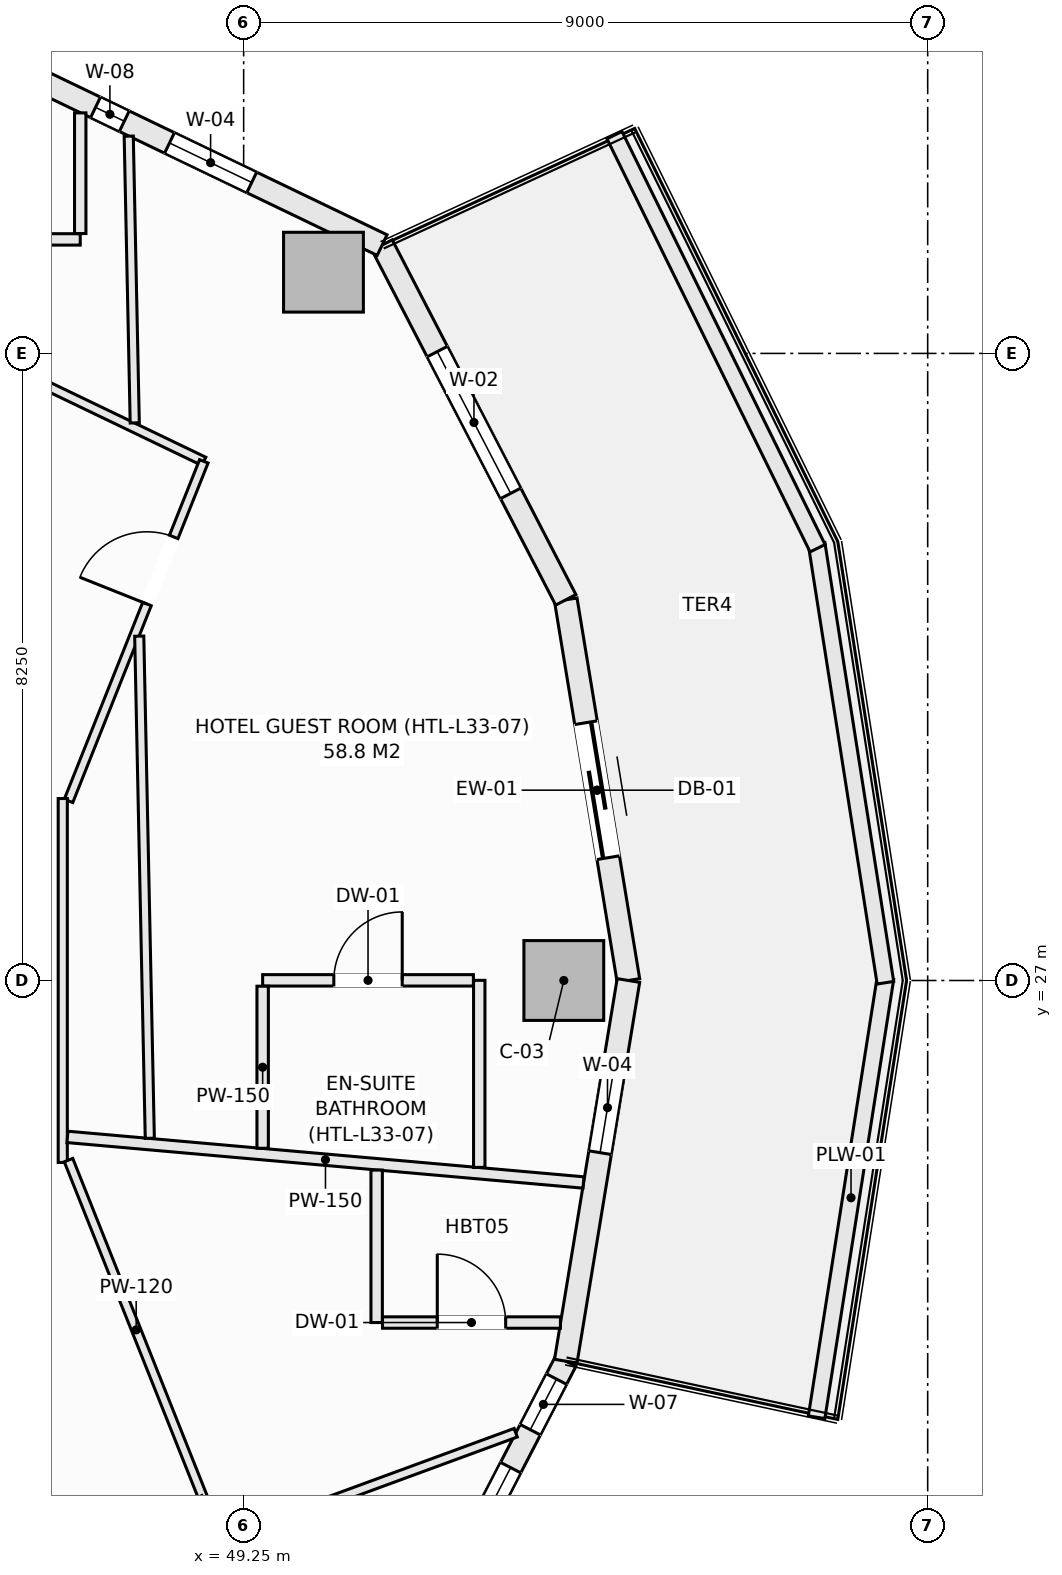
"""IFC4 building model, lengths in metres.
Left out: names, types, materials, properties, quantities, classifications, styles, units other than length and angle.
Written with IfcOpenShell. Run it as: python <this file> out.ifc"""

import sys

from ifc_helpers import new_model, si_unit, direction, frame, frame_2d, origin, origin_2d, place, context, subcontext, project, spatial, rectangle, extrude, element, fill, save


model = new_model("IFC4")
c1 = context("Model", 3, precision=1e-05, world=origin(), true_north=direction((0.0, 1.0)))
c2 = subcontext(c1, "Body", "Model", "MODEL_VIEW")
j1 = project(units=[si_unit("LENGTHUNIT", "METRE"), si_unit("PLANEANGLEUNIT", "RADIAN")], contexts=[c1])
p1 = place(None, origin())
s1 = spatial("IfcSite", under=j1, at=p1, CompositionType="ELEMENT")
p2 = place(p1, origin())
s2 = spatial("IfcBuilding", under=s1, at=p2, CompositionType="ELEMENT")
p3 = place(p2, frame((0.0, 0.0, 132.5)))
s3 = spatial("IfcBuildingStorey", under=s2, at=p3, CompositionType="ELEMENT", Elevation=132.5)
for number, where, z_axis, x_axis in (
    (1, (53.462, 27.0, -0.27), (0.0, 0.0, 1.0), (1.0, 0.0, 0.0)),
    (2, (50.3, 36.319, -0.27), (0.0, 0.0, 1.0), (1.0, 0.0, 0.0)),
):
    element("IfcColumn", number, at=place(p3, frame(where, z_axis=z_axis, x_axis=x_axis)), inside=s3, PredefinedType="COLUMN", context=c2, shape_type="SweptSolid", body=[
        extrude(rectangle(XDim=1.05, YDim=1.05, at=origin_2d()), origin(), (0.0, 0.0, 1.0), 3.4),
    ])
p4 = place(p3, frame((53.488, 32.008, 0.0), z_axis=(0.0, 0.0, 1.0), x_axis=(0.162393944769, -0.986726003864, 0.0)))
e3 = element("IfcWall", 3, at=p4, inside=s3, PredefinedType="SOLIDWALL", context=c2, shape_type="SweptSolid", body=[
    extrude(rectangle(XDim=5.075, YDim=0.3, at=frame_2d((2.538, 0.0))), origin(), (0.0, 0.0, 1.0), 2.653),
])
p5 = place(p4, frame((1.638, 0.0, 0.0)))
e4 = element("IfcOpeningElement", 4, at=p5, cuts=e3, PredefinedType="OPENING", context=c2, shape_type="SweptSolid", body=[
    extrude(rectangle(XDim=1.8, YDim=2.25, at=frame_2d((0.9, 1.125))), frame((0.0, 0.16, 0.0), z_axis=(0.0, -1.0, 0.0), x_axis=(1.0, 0.0, 0.0)), (0.0, 0.0, 1.0), 0.32),
])
p6 = place(p3, frame((51.072, 36.675, 0.0), z_axis=(0.0, 0.0, 1.0), x_axis=(0.459767899643, -0.888039119892, 0.0)))
e5 = element("IfcWall", 5, at=p6, inside=s3, PredefinedType="SOLIDWALL", context=c2, shape_type="SweptSolid", body=[
    extrude(rectangle(XDim=5.255, YDim=0.3, at=frame_2d((2.628, 0.0))), origin(), (0.0, 0.0, 1.0), 2.653),
])
p7 = place(p6, frame((1.578, 0.0, 0.74)))
e6 = element("IfcOpeningElement", 6, at=p7, cuts=e5, PredefinedType="OPENING", context=c2, shape_type="SweptSolid", body=[
    extrude(rectangle(XDim=2.1, YDim=1.7, at=frame_2d((1.05, 0.85))), frame((0.0, 0.16, 0.0), z_axis=(0.0, -1.0, 0.0), x_axis=(1.0, 0.0, 0.0)), (0.0, 0.0, 1.0), 0.32),
])
p8 = place(p3, frame((45.769, 39.223, 0.0), z_axis=(0.0, 0.0, 1.0), x_axis=(0.901370184739, -0.433049408339, 0.0)))
e7 = element("IfcWall", 7, at=p8, inside=s3, PredefinedType="SOLIDWALL", context=c2, shape_type="SweptSolid", body=[
    extrude(rectangle(XDim=5.884, YDim=0.3, at=frame_2d((2.942, 0.0))), origin(), (0.0, 0.0, 1.0), 2.653),
])
p9 = place(p8, frame((2.78, 0.0, 0.72)))
e8 = element("IfcOpeningElement", 8, at=p9, cuts=e7, PredefinedType="OPENING", context=c2, shape_type="SweptSolid", body=[
    extrude(rectangle(XDim=1.2, YDim=1.65, at=frame_2d((0.6, 0.825))), frame((0.0, 0.16, 0.0), z_axis=(0.0, -1.0, 0.0), x_axis=(1.0, 0.0, 0.0)), (0.0, 0.0, 1.0), 0.32),
])
p10 = place(p8, frame((1.7, 0.0, 0.72)))
e9 = element("IfcOpeningElement", 9, at=p10, cuts=e7, PredefinedType="OPENING", context=c2, shape_type="SweptSolid", body=[
    extrude(rectangle(XDim=0.42, YDim=1.65, at=frame_2d((0.21, 0.825))), frame((0.0, 0.16, 0.0), z_axis=(0.0, -1.0, 0.0), x_axis=(1.0, 0.0, 0.0)), (0.0, 0.0, 1.0), 0.32),
])
p11 = place(p3, frame((51.072, 17.325, 0.0), z_axis=(0.0, 0.0, 1.0), x_axis=(0.459767899643, 0.888039119892, 0.0)))
e10 = element("IfcWall", 10, at=p11, inside=s3, PredefinedType="SOLIDWALL", context=c2, shape_type="SweptSolid", body=[
    extrude(rectangle(XDim=5.255, YDim=0.3, at=frame_2d((2.628, 0.0))), origin(), (0.0, 0.0, 1.0), 2.653),
])
p12 = place(p11, frame((1.578, 0.0, 0.74)))
e11 = element("IfcOpeningElement", 11, at=p12, cuts=e10, PredefinedType="OPENING", context=c2, shape_type="SweptSolid", body=[
    extrude(rectangle(XDim=2.1, YDim=1.7, at=frame_2d((1.05, 0.85))), frame((0.0, 0.16, 0.0), z_axis=(0.0, -1.0, 0.0), x_axis=(1.0, 0.0, 0.0)), (0.0, 0.0, 1.0), 0.32),
])
p13 = place(p11, frame((4.24, 0.0, 0.72)))
e12 = element("IfcOpeningElement", 12, at=p13, cuts=e10, PredefinedType="OPENING", context=c2, shape_type="SweptSolid", body=[
    extrude(rectangle(XDim=0.75, YDim=1.65, at=frame_2d((0.375, 0.825))), frame((0.0, 0.16, 0.0), z_axis=(0.0, -1.0, 0.0), x_axis=(1.0, 0.0, 0.0)), (0.0, 0.0, 1.0), 0.32),
])
p14 = place(p3, frame((53.488, 21.992, 0.0), z_axis=(0.0, 0.0, 1.0), x_axis=(0.162393944769, 0.986726003864, 0.0)))
e13 = element("IfcWall", 13, at=p14, inside=s3, PredefinedType="SOLIDWALL", context=c2, shape_type="SweptSolid", body=[
    extrude(rectangle(XDim=5.075, YDim=0.3, at=frame_2d((2.538, 0.0))), origin(), (0.0, 0.0, 1.0), 2.653),
])
p15 = place(p14, frame((2.78, 0.0, 0.72)))
e14 = element("IfcOpeningElement", 14, at=p15, cuts=e13, PredefinedType="OPENING", context=c2, shape_type="SweptSolid", body=[
    extrude(rectangle(XDim=1.2, YDim=1.65, at=frame_2d((0.6, 0.825))), frame((0.0, 0.16, 0.0), z_axis=(0.0, -1.0, 0.0), x_axis=(1.0, 0.0, 0.0)), (0.0, 0.0, 1.0), 0.32),
])
for number, where, z_axis, x_axis in (
    (15, (56.789, 21.254, 0.0), (0.0, 0.0, 1.0), (0.155, 0.988, 0.0)),
    (16, (56.789, 32.746, 0.0), (0.0, 0.0, 1.0), (0.155, -0.988, 0.0)),
):
    element("IfcWall", number, at=place(p3, frame(where, z_axis=z_axis, x_axis=x_axis)), inside=s3, PredefinedType="PARAPET", context=c2, shape_type="SweptSolid", body=[
        extrude(rectangle(XDim=5.846, YDim=0.22, at=frame_2d((2.923, 0.0))), origin(), (0.0, 0.0, 1.0), 0.52),
    ])
p16 = place(p3, frame((54.129, 38.122, 0.0), z_axis=(0.0, 0.0, 1.0), x_axis=(0.441269631716, -0.897374566235, 0.0)))
e17 = element("IfcWall", 17, at=p16, inside=s3, PredefinedType="PARAPET", context=c2, shape_type="SweptSolid", body=[
    extrude(rectangle(XDim=6.056, YDim=0.22, at=frame_2d((3.028, 0.0))), origin(), (0.0, 0.0, 1.0), 0.52),
])
p17 = place(p3, frame((46.65, 34.828, 0.0), z_axis=(0.0, 0.0, 1.0), x_axis=(0.901271525254, -0.433254703109, 0.0)))
e18 = element("IfcWall", 18, at=p17, inside=s3, PredefinedType="PARTITIONING", context=c2, shape_type="SweptSolid", body=[
    extrude(rectangle(XDim=2.304, YDim=0.12, at=frame_2d((1.152, 0.0))), origin(), (0.0, 0.0, 1.0), 3.13),
])
p18 = place(p3, frame((46.946, 29.363, 0.0), z_axis=(0.0, 0.0, 1.0), x_axis=(0.370173596818, 0.928962597858, 0.0)))
e19 = element("IfcWall", 19, at=p18, inside=s3, PredefinedType="PARTITIONING", context=c2, shape_type="SweptSolid", body=[
    extrude(rectangle(XDim=4.809, YDim=0.12, at=frame_2d((2.404, 0.0))), origin(), (0.0, 0.0, 1.0), 3.13),
])
p19 = place(p18, frame((2.788, 0.0, 0.0)))
e20 = element("IfcOpeningElement", 20, at=p19, cuts=e19, PredefinedType="OPENING", context=c2, shape_type="SweptSolid", body=[
    extrude(rectangle(XDim=0.95, YDim=2.1, at=frame_2d((0.475, 1.05))), frame((0.0, 0.07, 0.0), z_axis=(0.0, -1.0, 0.0), x_axis=(1.0, 0.0, 0.0)), (0.0, 0.0, 1.0), 0.14),
])
p20 = place(p3, frame((46.87, 24.606, 0.0), z_axis=(0.0, 0.0, 1.0), x_axis=(0.0, 1.0, 0.0)))
e21 = element("IfcWall", 21, at=p20, inside=s3, PredefinedType="PARTITIONING", context=c2, shape_type="SweptSolid", body=[
    extrude(rectangle(XDim=4.788, YDim=0.12, at=frame_2d((2.394, 0.0))), origin(), (0.0, 0.0, 1.0), 3.13),
])
p21 = place(p3, frame((46.946, 24.637, 0.0), z_axis=(0.0, 0.0, 1.0), x_axis=(0.370173596818, -0.928962597858, 0.0)))
e22 = element("IfcWall", 22, at=p21, inside=s3, PredefinedType="PARTITIONING", context=c2, shape_type="SweptSolid", body=[
    extrude(rectangle(XDim=4.809, YDim=0.12, at=frame_2d((2.404, 0.0))), origin(), (0.0, 0.0, 1.0), 3.13),
])
p22 = place(p3, frame((46.932, 24.942, 0.0), z_axis=(0.0, 0.0, 1.0), x_axis=(0.996119604576, -0.088009848195, 0.0)))
e23 = element("IfcWall", 23, at=p22, inside=s3, PredefinedType="PARTITIONING", context=c2, shape_type="SweptSolid", body=[
    extrude(rectangle(XDim=6.816, YDim=0.15, at=frame_2d((3.408, 0.0))), origin(), (0.0, 0.0, 1.0), 3.13),
])
p23 = place(p3, frame((39.082, 16.003, 0.0), z_axis=(0.0, 0.0, 1.0), x_axis=(0.93872535699, 0.344666076288, 0.0)))
e24 = element("IfcWall", 24, at=p23, inside=s3, PredefinedType="PARTITIONING", context=c2, shape_type="SweptSolid", body=[
    extrude(rectangle(XDim=14.645, YDim=0.12, at=frame_2d((7.323, 0.0))), origin(), (0.0, 0.0, 1.0), 3.13),
])
p24 = place(p3, frame((51.0, 22.5, 0.0), z_axis=(0.0, 0.0, 1.0), x_axis=(0.0, 1.0, 0.0)))
e25 = element("IfcWall", 25, at=p24, inside=s3, PredefinedType="PARTITIONING", context=c2, shape_type="SweptSolid", body=[
    extrude(rectangle(XDim=2.006, YDim=0.15, at=frame_2d((1.003, 0.0))), origin(), (0.0, 0.0, 1.0), 3.13),
])
p25 = place(p3, frame((51.077, 22.5, 0.0), z_axis=(0.0, 0.0, 1.0), x_axis=(1.0, 0.0, 0.0)))
e26 = element("IfcWall", 26, at=p25, inside=s3, PredefinedType="PARTITIONING", context=c2, shape_type="SweptSolid", body=[
    extrude(rectangle(XDim=2.341, YDim=0.15, at=frame_2d((1.17, 0.0))), origin(), (0.0, 0.0, 1.0), 2.812),
])
p26 = place(p25, frame((0.72, 0.0, 0.0)))
e27 = element("IfcOpeningElement", 27, at=p26, cuts=e26, PredefinedType="OPENING", context=c2, shape_type="SweptSolid", body=[
    extrude(rectangle(XDim=0.9, YDim=2.1, at=frame_2d((0.45, 1.05))), frame((0.0, 0.085, 0.0), z_axis=(0.0, -1.0, 0.0), x_axis=(1.0, 0.0, 0.0)), (0.0, 0.0, 1.0), 0.17),
])
p27 = place(p3, frame((52.35, 24.541, 0.0), z_axis=(0.0, 0.0, 1.0), x_axis=(0.0, 1.0, 0.0)))
e28 = element("IfcWall", 28, at=p27, inside=s3, PredefinedType="PARTITIONING", context=c2, shape_type="SweptSolid", body=[
    extrude(rectangle(XDim=2.461, YDim=0.15, at=frame_2d((1.23, 0.0))), origin(), (0.0, 0.0, 1.0), 3.13),
])
p28 = place(p3, frame((49.5, 27.002, 0.0), z_axis=(0.0, 0.0, 1.0), x_axis=(1.0, 0.0, 0.0)))
e29 = element("IfcWall", 29, at=p28, inside=s3, PredefinedType="PARTITIONING", context=c2, shape_type="SweptSolid", body=[
    extrude(rectangle(XDim=2.773, YDim=0.15, at=frame_2d((1.386, 0.0))), origin(), (0.0, 0.0, 1.0), 2.505),
])
p29 = place(p28, frame((0.937, 0.0, 0.0)))
e30 = element("IfcOpeningElement", 30, at=p29, cuts=e29, PredefinedType="OPENING", context=c2, shape_type="SweptSolid", body=[
    extrude(rectangle(XDim=0.9, YDim=2.1, at=frame_2d((0.45, 1.05))), frame((0.0, 0.085, 0.0), z_axis=(0.0, -1.0, 0.0), x_axis=(1.0, 0.0, 0.0)), (0.0, 0.0, 1.0), 0.17),
])
p30 = place(p3, frame((49.5, 24.793, 0.0), z_axis=(0.0, 0.0, 1.0), x_axis=(0.0, 1.0, 0.0)))
e31 = element("IfcWall", 31, at=p30, inside=s3, PredefinedType="PARTITIONING", context=c2, shape_type="SweptSolid", body=[
    extrude(rectangle(XDim=2.132, YDim=0.15, at=frame_2d((1.066, 0.0))), origin(), (0.0, 0.0, 1.0), 3.13),
])
p31 = place(p3, frame((47.738, 38.108, 0.0), z_axis=(0.0, 0.0, 1.0), x_axis=(0.021028225265, -0.999778882425, 0.0)))
e32 = element("IfcWall", 32, at=p31, inside=s3, PredefinedType="PARTITIONING", context=c2, shape_type="SweptSolid", body=[
    extrude(rectangle(XDim=3.773, YDim=0.12, at=frame_2d((1.887, 0.0))), origin(), (0.0, 0.0, 1.0), 3.13),
])
p32 = place(p3, frame((47.876, 31.53, 0.0), z_axis=(0.0, 0.0, 1.0), x_axis=(0.021060407881, -0.999778205013, 0.0)))
e33 = element("IfcWall", 33, at=p32, inside=s3, PredefinedType="PARTITIONING", context=c2, shape_type="SweptSolid", body=[
    extrude(rectangle(XDim=6.608, YDim=0.12, at=frame_2d((3.304, 0.0))), origin(), (0.0, 0.0, 1.0), 3.13),
])
p33 = place(p3, frame((44.225, 36.75, 0.0), z_axis=(0.0, 0.0, 1.0), x_axis=(1.0, 0.0, 0.0)))
e34 = element("IfcWall", 34, at=p33, inside=s3, PredefinedType="PARTITIONING", context=c2, shape_type="SweptSolid", body=[
    extrude(rectangle(XDim=2.875, YDim=0.15, at=frame_2d((1.438, 0.0))), origin(), (0.0, 0.0, 1.0), 3.13),
])
p34 = place(p33, frame((0.988, 0.0, 0.0)))
e35 = element("IfcOpeningElement", 35, at=p34, cuts=e34, PredefinedType="OPENING", context=c2, shape_type="SweptSolid", body=[
    extrude(rectangle(XDim=0.9, YDim=2.1, at=frame_2d((0.45, 1.05))), frame((0.0, 0.085, 0.0), z_axis=(0.0, -1.0, 0.0), x_axis=(1.0, 0.0, 0.0)), (0.0, 0.0, 1.0), 0.17),
])
p35 = place(p3, frame((47.1, 36.827, 0.0), z_axis=(0.0, 0.0, 1.0), x_axis=(0.0, 1.0, 0.0)))
e36 = element("IfcWall", 36, at=p35, inside=s3, PredefinedType="PARTITIONING", context=c2, shape_type="SweptSolid", body=[
    extrude(rectangle(XDim=1.588, YDim=0.15, at=frame_2d((0.794, 0.0))), origin(), (0.0, 0.0, 1.0), 3.13),
])
p36 = place(p5, origin())
e37 = element("IfcDoor", 37, at=p36, inside=s3, OperationType="SLIDING_TO_LEFT", PredefinedType="DOOR", context=c2, shape_type="SweptSolid", body=[
    extrude(rectangle(XDim=1.8, YDim=2.25, at=frame_2d((0.9, 1.125))), frame((0.0, 0.025, 0.0), z_axis=(0.0, -1.0, 0.0), x_axis=(1.0, 0.0, 0.0)), (0.0, 0.0, 1.0), 0.05),
])
fill(e4, e37)
p37 = place(p7, origin())
e38 = element("IfcWindow", 38, at=p37, inside=s3, PartitioningType="SINGLE_PANEL", PredefinedType="WINDOW", context=c2, shape_type="SweptSolid", body=[
    extrude(rectangle(XDim=2.1, YDim=1.7, at=frame_2d((1.05, 0.85))), frame((0.0, 0.03, 0.0), z_axis=(0.0, -1.0, 0.0), x_axis=(1.0, 0.0, 0.0)), (0.0, 0.0, 1.0), 0.06),
])
fill(e6, e38)
p38 = place(p9, origin())
e39 = element("IfcWindow", 39, at=p38, inside=s3, PartitioningType="SINGLE_PANEL", PredefinedType="WINDOW", context=c2, shape_type="SweptSolid", body=[
    extrude(rectangle(XDim=1.2, YDim=1.65, at=frame_2d((0.6, 0.825))), frame((0.0, 0.03, 0.0), z_axis=(0.0, -1.0, 0.0), x_axis=(1.0, 0.0, 0.0)), (0.0, 0.0, 1.0), 0.06),
])
fill(e8, e39)
p39 = place(p12, origin())
e40 = element("IfcWindow", 40, at=p39, inside=s3, PartitioningType="SINGLE_PANEL", PredefinedType="WINDOW", context=c2, shape_type="SweptSolid", body=[
    extrude(rectangle(XDim=2.1, YDim=1.7, at=frame_2d((1.05, 0.85))), frame((0.0, 0.03, 0.0), z_axis=(0.0, -1.0, 0.0), x_axis=(1.0, 0.0, 0.0)), (0.0, 0.0, 1.0), 0.06),
])
fill(e11, e40)
p40 = place(p15, origin())
e41 = element("IfcWindow", 41, at=p40, inside=s3, PartitioningType="SINGLE_PANEL", PredefinedType="WINDOW", context=c2, shape_type="SweptSolid", body=[
    extrude(rectangle(XDim=1.2, YDim=1.65, at=frame_2d((0.6, 0.825))), frame((0.0, 0.03, 0.0), z_axis=(0.0, -1.0, 0.0), x_axis=(1.0, 0.0, 0.0)), (0.0, 0.0, 1.0), 0.06),
])
fill(e14, e41)
p41 = place(p19, origin())
e42 = element("IfcDoor", 42, at=p41, inside=s3, OperationType="SINGLE_SWING_LEFT", PredefinedType="DOOR", context=c2, shape_type="SweptSolid", body=[
    extrude(rectangle(XDim=0.95, YDim=2.1, at=frame_2d((0.475, 1.05))), frame((0.0, 0.025, 0.0), z_axis=(0.0, -1.0, 0.0), x_axis=(1.0, 0.0, 0.0)), (0.0, 0.0, 1.0), 0.05),
])
fill(e20, e42)
p42 = place(p26, origin())
e43 = element("IfcDoor", 43, at=p42, inside=s3, OperationType="SINGLE_SWING_LEFT", PredefinedType="DOOR", context=c2, shape_type="SweptSolid", body=[
    extrude(rectangle(XDim=0.9, YDim=2.1, at=frame_2d((0.45, 1.05))), frame((0.0, 0.025, 0.0), z_axis=(0.0, -1.0, 0.0), x_axis=(1.0, 0.0, 0.0)), (0.0, 0.0, 1.0), 0.05),
])
fill(e27, e43)
p43 = place(p29, origin())
e44 = element("IfcDoor", 44, at=p43, inside=s3, OperationType="SINGLE_SWING_RIGHT", PredefinedType="DOOR", context=c2, shape_type="SweptSolid", body=[
    extrude(rectangle(XDim=0.9, YDim=2.1, at=frame_2d((0.45, 1.05))), frame((0.0, 0.025, 0.0), z_axis=(0.0, -1.0, 0.0), x_axis=(1.0, 0.0, 0.0)), (0.0, 0.0, 1.0), 0.05),
])
fill(e30, e44)
p44 = place(p13, origin())
e45 = element("IfcWindow", 45, at=p44, inside=s3, PartitioningType="SINGLE_PANEL", PredefinedType="WINDOW", context=c2, shape_type="SweptSolid", body=[
    extrude(rectangle(XDim=0.75, YDim=1.65, at=frame_2d((0.375, 0.825))), frame((0.0, 0.03, 0.0), z_axis=(0.0, -1.0, 0.0), x_axis=(1.0, 0.0, 0.0)), (0.0, 0.0, 1.0), 0.06),
])
fill(e12, e45)
p45 = place(p10, origin())
e46 = element("IfcWindow", 46, at=p45, inside=s3, PartitioningType="SINGLE_PANEL", PredefinedType="WINDOW", context=c2, shape_type="SweptSolid", body=[
    extrude(rectangle(XDim=0.42, YDim=1.65, at=frame_2d((0.21, 0.825))), frame((0.0, 0.03, 0.0), z_axis=(0.0, -1.0, 0.0), x_axis=(1.0, 0.0, 0.0)), (0.0, 0.0, 1.0), 0.06),
])
fill(e9, e46)
save(model, sys.argv[1])
